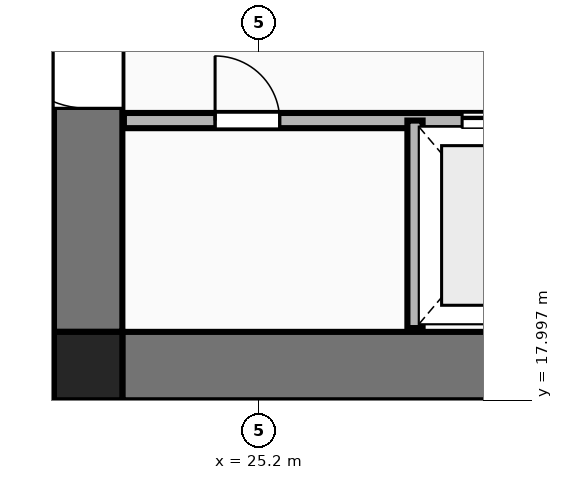
"""IFC4 building model, lengths in metres.
Left out: names, types, materials, properties, quantities, classifications, styles, units other than length and angle.
Written with IfcOpenShell. Run it as: python <this file> out.ifc"""

import sys

from ifc_helpers import new_model, si_unit, direction, frame, frame_2d, origin, origin_2d, place, context, subcontext, project, spatial, rectangle, extrude, element, fill, save


model = new_model("IFC4")
c1 = context("Model", 3, precision=1e-05, world=origin(), true_north=direction((0.0, 1.0)))
c2 = subcontext(c1, "Body", "Model", "MODEL_VIEW")
j1 = project(units=[si_unit("LENGTHUNIT", "METRE"), si_unit("PLANEANGLEUNIT", "RADIAN")], contexts=[c1])
p1 = place(None, origin())
s1 = spatial("IfcSite", under=j1, at=p1, CompositionType="ELEMENT")
p2 = place(p1, origin())
s2 = spatial("IfcBuilding", under=s1, at=p2, CompositionType="ELEMENT")
p3 = place(p2, frame((0.0, 0.0, 49.75)))
s3 = spatial("IfcBuildingStorey", under=s2, at=p3, CompositionType="ELEMENT", Elevation=49.75)
p4 = place(p3, frame((22.95, 18.45, 0.0), z_axis=(0.0, 0.0, 1.0), x_axis=(1.0, 0.0, 0.0)))
e1 = element("IfcColumn", 1, at=p4, inside=s3, PredefinedType="COLUMN", context=c2, shape_type="SweptSolid", body=[
    extrude(rectangle(XDim=0.9, YDim=0.9, at=origin_2d()), origin(), (0.0, 0.0, 1.0), 3.55),
])
p5 = place(p3, frame((23.4, 18.45, 0.0), z_axis=(0.0, 0.0, 1.0), x_axis=(1.0, 0.0, 0.0)))
e2 = element("IfcWall", 2, at=p5, inside=s3, PredefinedType="SHEAR", context=c2, shape_type="SweptSolid", body=[
    extrude(rectangle(XDim=18.0, YDim=0.9, at=frame_2d((9.0, 0.0))), origin(), (0.0, 0.0, 1.0), 3.33),
])
p6 = place(p3, frame((22.95, 18.9, 0.0), z_axis=(0.0, 0.0, 1.0), x_axis=(0.0, 1.0, 0.0)))
e3 = element("IfcWall", 3, at=p6, inside=s3, PredefinedType="SHEAR", context=c2, shape_type="SweptSolid", body=[
    extrude(rectangle(XDim=14.0, YDim=0.9, at=frame_2d((7.0, 0.0))), origin(), (0.0, 0.0, 1.0), 3.33),
])
p7 = place(p6, frame((2.94, 0.0, 0.0)))
e4 = element("IfcOpeningElement", 4, at=p7, cuts=e3, PredefinedType="OPENING", context=c2, shape_type="SweptSolid", body=[
    extrude(rectangle(XDim=1.22, YDim=2.25, at=frame_2d((0.61, 1.125))), frame((0.0, 0.46, 0.0), z_axis=(0.0, -1.0, 0.0), x_axis=(1.0, 0.0, 0.0)), (0.0, 0.0, 1.0), 0.92),
])
p8 = place(p3, frame((23.42, 21.68, 0.0), z_axis=(0.0, 0.0, 1.0), x_axis=(1.0, 0.0, 0.0)))
e5 = element("IfcWall", 5, at=p8, inside=s3, PredefinedType="PLUMBINGWALL", context=c2, shape_type="SweptSolid", body=[
    extrude(rectangle(XDim=17.96, YDim=0.2, at=frame_2d((8.98, 0.0))), origin(), (0.0, 0.0, 1.0), 3.33),
])
p9 = place(p8, frame((4.45, 0.0, 0.0)))
e6 = element("IfcOpeningElement", 6, at=p9, cuts=e5, PredefinedType="OPENING", context=c2, shape_type="SweptSolid", body=[
    extrude(rectangle(XDim=1.1, YDim=2.2, at=frame_2d((0.55, 1.1))), frame((0.0, 0.11, 0.0), z_axis=(0.0, -1.0, 0.0), x_axis=(1.0, 0.0, 0.0)), (0.0, 0.0, 1.0), 0.22),
])
p10 = place(p8, frame((6.85, 0.0, 0.0)))
e7 = element("IfcOpeningElement", 7, at=p10, cuts=e5, PredefinedType="OPENING", context=c2, shape_type="SweptSolid", body=[
    extrude(rectangle(XDim=1.1, YDim=2.2, at=frame_2d((0.55, 1.1))), frame((0.0, 0.11, 0.0), z_axis=(0.0, -1.0, 0.0), x_axis=(1.0, 0.0, 0.0)), (0.0, 0.0, 1.0), 0.22),
])
p11 = place(p8, frame((9.25, 0.0, 0.0)))
e8 = element("IfcOpeningElement", 8, at=p11, cuts=e5, PredefinedType="OPENING", context=c2, shape_type="SweptSolid", body=[
    extrude(rectangle(XDim=1.1, YDim=2.2, at=frame_2d((0.55, 1.1))), frame((0.0, 0.11, 0.0), z_axis=(0.0, -1.0, 0.0), x_axis=(1.0, 0.0, 0.0)), (0.0, 0.0, 1.0), 0.22),
])
p12 = place(p8, frame((1.2, 0.0, 0.0)))
e9 = element("IfcOpeningElement", 9, at=p12, cuts=e5, PredefinedType="OPENING", context=c2, shape_type="SweptSolid", body=[
    extrude(rectangle(XDim=0.85, YDim=2.05, at=frame_2d((0.425, 1.025))), frame((0.0, 0.11, 0.0), z_axis=(0.0, -1.0, 0.0), x_axis=(1.0, 0.0, 0.0)), (0.0, 0.0, 1.0), 0.22),
])
p13 = place(p8, frame((13.55, 0.0, 0.0)))
e10 = element("IfcOpeningElement", 10, at=p13, cuts=e5, PredefinedType="OPENING", context=c2, shape_type="SweptSolid", body=[
    extrude(rectangle(XDim=0.85, YDim=2.05, at=frame_2d((0.425, 1.025))), frame((0.0, 0.11, 0.0), z_axis=(0.0, -1.0, 0.0), x_axis=(1.0, 0.0, 0.0)), (0.0, 0.0, 1.0), 0.22),
])
p14 = place(p8, frame((15.85, 0.0, 0.0)))
e11 = element("IfcOpeningElement", 11, at=p14, cuts=e5, PredefinedType="OPENING", context=c2, shape_type="SweptSolid", body=[
    extrude(rectangle(XDim=0.85, YDim=2.05, at=frame_2d((0.425, 1.025))), frame((0.0, 0.11, 0.0), z_axis=(0.0, -1.0, 0.0), x_axis=(1.0, 0.0, 0.0)), (0.0, 0.0, 1.0), 0.22),
])
p15 = place(p3, frame((27.25, 18.95, 0.0), z_axis=(0.0, 0.0, 1.0), x_axis=(0.0, 1.0, 0.0)))
e12 = element("IfcWall", 12, at=p15, inside=s3, PredefinedType="PLUMBINGWALL", context=c2, shape_type="SweptSolid", body=[
    extrude(rectangle(XDim=2.73, YDim=0.2, at=frame_2d((1.365, 0.0))), origin(), (0.0, 0.0, 1.0), 3.33),
])
p16 = place(p7, origin())
e13 = element("IfcDoor", 13, at=p16, inside=s3, OperationType="SINGLE_SWING_RIGHT", PredefinedType="DOOR", context=c2, shape_type="SweptSolid", body=[
    extrude(rectangle(XDim=1.22, YDim=2.25, at=frame_2d((0.61, 1.125))), frame((0.0, 0.025, 0.0), z_axis=(0.0, -1.0, 0.0), x_axis=(1.0, 0.0, 0.0)), (0.0, 0.0, 1.0), 0.05),
])
fill(e4, e13)
p17 = place(p9, origin())
e14 = element("IfcDoor", 14, at=p17, inside=s3, OperationType="DOUBLE_DOOR_SLIDING", PredefinedType="DOOR", context=c2, shape_type="SweptSolid", body=[
    extrude(rectangle(XDim=1.1, YDim=2.2, at=frame_2d((0.55, 1.1))), frame((0.0, 0.025, 0.0), z_axis=(0.0, -1.0, 0.0), x_axis=(1.0, 0.0, 0.0)), (0.0, 0.0, 1.0), 0.05),
])
fill(e6, e14)
p18 = place(p12, origin())
e15 = element("IfcDoor", 15, at=p18, inside=s3, OperationType="SINGLE_SWING_LEFT", PredefinedType="DOOR", context=c2, shape_type="SweptSolid", body=[
    extrude(rectangle(XDim=0.85, YDim=2.05, at=frame_2d((0.425, 1.025))), frame((0.0, 0.025, 0.0), z_axis=(0.0, -1.0, 0.0), x_axis=(1.0, 0.0, 0.0)), (0.0, 0.0, 1.0), 0.05),
])
fill(e9, e15)
save(model, sys.argv[1])
